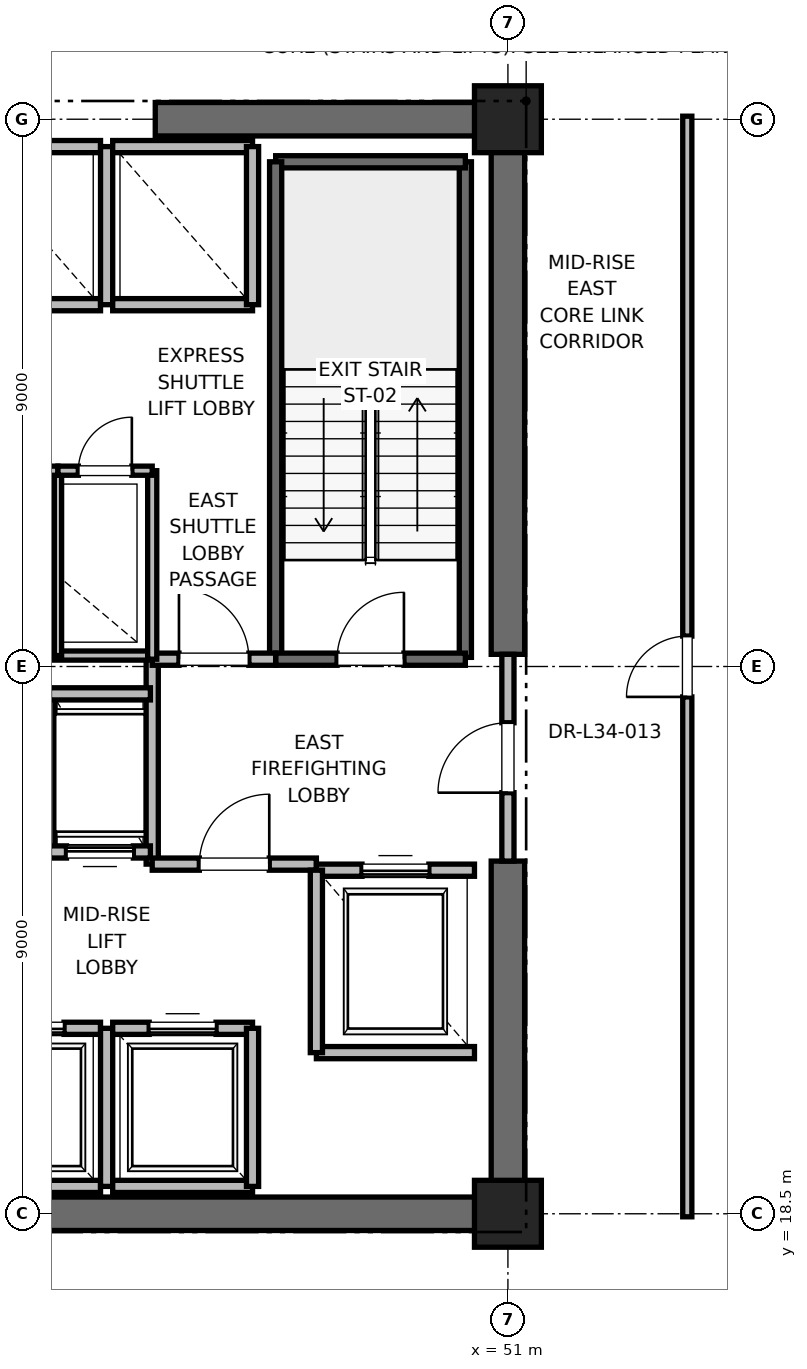
"""IFC4 building model, lengths in metres.
Left out: names, types, materials, properties, quantities, classifications, styles, units other than length and angle.
Written with IfcOpenShell. Run it as: python <this file> out.ifc"""

import sys

from ifc_helpers import new_model, si_unit, direction, frame, frame_2d, origin, origin_2d, place, context, subcontext, project, spatial, rectangle, extrude, element, fill, save


model = new_model("IFC4")
c1 = context("Model", 3, precision=1e-05, world=origin(), true_north=direction((0.0, 1.0)))
c2 = subcontext(c1, "Body", "Model", "MODEL_VIEW")
j1 = project(units=[si_unit("LENGTHUNIT", "METRE"), si_unit("PLANEANGLEUNIT", "RADIAN")], contexts=[c1])
p1 = place(None, origin())
s1 = spatial("IfcSite", under=j1, at=p1, CompositionType="ELEMENT")
p2 = place(p1, origin())
s2 = spatial("IfcBuilding", under=s1, at=p2, CompositionType="ELEMENT")
p3 = place(p2, frame((0.0, 0.0, 148.4)))
s3 = spatial("IfcBuildingStorey", under=s2, at=p3, CompositionType="ELEMENT", Elevation=148.4)
for number, where, z_axis, x_axis in (
    (1, (51.0, 18.5, 0.0), (0.0, 0.0, 1.0), (1.0, 0.0, 0.0)),
    (2, (51.0, 36.5, 0.0), (0.0, 0.0, 1.0), (1.0, 0.0, 0.0)),
):
    element("IfcColumn", number, at=place(p3, frame(where, z_axis=z_axis, x_axis=x_axis)), inside=s3, PredefinedType="PILASTER", context=c2, shape_type="SweptSolid", body=[
        extrude(rectangle(XDim=1.1, YDim=1.1, at=origin_2d()), origin(), (0.0, 0.0, 1.0), 4.0),
    ])
p4 = place(p3, frame((41.8, 18.5, 0.0), z_axis=(0.0, 0.0, 1.0), x_axis=(1.0, 0.0, 0.0)))
e3 = element("IfcWall", 3, at=p4, inside=s3, PredefinedType="SHEAR", context=c2, shape_type="SweptSolid", body=[
    extrude(rectangle(XDim=9.2, YDim=0.55, at=frame_2d((4.6, 0.0))), origin(), (0.0, 0.0, 1.0), 3.775),
])
for number, where, z_axis, x_axis in (
    (4, (45.2, 36.5, 0.0), (0.0, 0.0, 1.0), (1.0, 0.0, 0.0)),
    (5, (51.0, 18.5, 0.0), (0.0, 0.0, 1.0), (0.0, 1.0, 0.0)),
):
    element("IfcWall", number, at=place(p3, frame(where, z_axis=z_axis, x_axis=x_axis)), inside=s3, PredefinedType="SHEAR", context=c2, shape_type="SweptSolid", body=[
        extrude(rectangle(XDim=5.8, YDim=0.55, at=frame_2d((2.9, 0.0))), origin(), (0.0, 0.0, 1.0), 3.775),
    ])
p5 = place(p3, frame((51.0, 27.7, 0.0), z_axis=(0.0, 0.0, 1.0), x_axis=(0.0, 1.0, 0.0)))
e6 = element("IfcWall", 6, at=p5, inside=s3, PredefinedType="SHEAR", context=c2, shape_type="SweptSolid", body=[
    extrude(rectangle(XDim=8.8, YDim=0.55, at=frame_2d((4.4, 0.0))), origin(), (0.0, 0.0, 1.0), 3.775),
])
p6 = place(p3, frame((50.3, 27.65, 0.0), z_axis=(0.0, 0.0, 1.0), x_axis=(0.0, 1.0, 0.0)))
e7 = element("IfcWall", 7, at=p6, inside=s3, PredefinedType="SOLIDWALL", context=c2, shape_type="SweptSolid", body=[
    extrude(rectangle(XDim=8.15, YDim=0.2, at=frame_2d((4.075, 0.0))), origin(), (0.0, 0.0, 1.0), 3.775),
])
p7 = place(p3, frame((47.18, 35.8, 0.0), z_axis=(0.0, 0.0, 1.0), x_axis=(1.0, 0.0, 0.0)))
e8 = element("IfcWall", 8, at=p7, inside=s3, PredefinedType="SOLIDWALL", context=c2, shape_type="SweptSolid", body=[
    extrude(rectangle(XDim=3.12, YDim=0.2, at=frame_2d((1.56, 0.0))), origin(), (0.0, 0.0, 1.0), 3.775),
])
p8 = place(p3, frame((47.18, 27.62, 0.0), z_axis=(0.0, 0.0, 1.0), x_axis=(0.0, 1.0, 0.0)))
e9 = element("IfcWall", 9, at=p8, inside=s3, PredefinedType="SOLIDWALL", context=c2, shape_type="SweptSolid", body=[
    extrude(rectangle(XDim=8.18, YDim=0.2, at=frame_2d((4.09, 0.0))), origin(), (0.0, 0.0, 1.0), 3.775),
])
p9 = place(p3, frame((47.18, 27.62, 0.0), z_axis=(0.0, 0.0, 1.0), x_axis=(1.0, 0.0, 0.0)))
e10 = element("IfcWall", 10, at=p9, inside=s3, PredefinedType="SOLIDWALL", context=c2, shape_type="SweptSolid", body=[
    extrude(rectangle(XDim=3.12, YDim=0.2, at=frame_2d((1.56, 0.0))), origin(), (0.0, 0.0, 1.0), 3.775),
])
p10 = place(p9, frame((1.01, 0.0, 0.0)))
e11 = element("IfcOpeningElement", 11, at=p10, cuts=e10, PredefinedType="OPENING", context=c2, shape_type="SweptSolid", body=[
    extrude(rectangle(XDim=1.1, YDim=2.15, at=frame_2d((0.55, 1.075))), frame((0.0, 0.1, 0.0), z_axis=(0.0, -1.0, 0.0), x_axis=(1.0, 0.0, 0.0)), (0.0, 0.0, 1.0), 0.2),
])
p11 = place(p3, frame((45.15, 24.25, 0.0), z_axis=(0.0, 0.0, 1.0), x_axis=(0.0, 1.0, 0.0)))
e12 = element("IfcWall", 12, at=p11, inside=s3, PredefinedType="PARTITIONING", context=c2, shape_type="SweptSolid", body=[
    extrude(rectangle(XDim=3.37, YDim=0.2, at=frame_2d((1.685, 0.0))), origin(), (0.0, 0.0, 1.0), 3.775),
])
p12 = place(p3, frame((45.15, 24.25, 0.0), z_axis=(0.0, 0.0, 1.0), x_axis=(1.0, 0.0, 0.0)))
e13 = element("IfcWall", 13, at=p12, inside=s3, PredefinedType="PARTITIONING", context=c2, shape_type="SweptSolid", body=[
    extrude(rectangle(XDim=2.7, YDim=0.2, at=frame_2d((1.35, 0.0))), origin(), (0.0, 0.0, 1.0), 3.775),
])
p13 = place(p12, frame((0.775, 0.0, 0.0)))
e14 = element("IfcOpeningElement", 14, at=p13, cuts=e13, PredefinedType="OPENING", context=c2, shape_type="SweptSolid", body=[
    extrude(rectangle(XDim=1.15, YDim=2.2, at=frame_2d((0.575, 1.1))), frame((0.0, 0.1, 0.0), z_axis=(0.0, -1.0, 0.0), x_axis=(1.0, 0.0, 0.0)), (0.0, 0.0, 1.0), 0.2),
])
p14 = place(p3, frame((45.15, 27.62, 0.0), z_axis=(0.0, 0.0, 1.0), x_axis=(1.0, 0.0, 0.0)))
e15 = element("IfcWall", 15, at=p14, inside=s3, PredefinedType="PARTITIONING", context=c2, shape_type="SweptSolid", body=[
    extrude(rectangle(XDim=2.03, YDim=0.2, at=frame_2d((1.015, 0.0))), origin(), (0.0, 0.0, 1.0), 3.775),
])
p15 = place(p14, frame((0.44, 0.0, 0.0)))
e16 = element("IfcOpeningElement", 16, at=p15, cuts=e15, PredefinedType="OPENING", context=c2, shape_type="SweptSolid", body=[
    extrude(rectangle(XDim=1.15, YDim=2.2, at=frame_2d((0.575, 1.1))), frame((0.0, 0.1, 0.0), z_axis=(0.0, -1.0, 0.0), x_axis=(1.0, 0.0, 0.0)), (0.0, 0.0, 1.0), 0.2),
])
p16 = place(p3, frame((51.0, 24.3, 0.0), z_axis=(0.0, 0.0, 1.0), x_axis=(0.0, 1.0, 0.0)))
e17 = element("IfcWall", 17, at=p16, inside=s3, PredefinedType="PARTITIONING", context=c2, shape_type="SweptSolid", body=[
    extrude(rectangle(XDim=3.4, YDim=0.2, at=frame_2d((1.7, 0.0))), origin(), (0.0, 0.0, 1.0), 2.755),
])
p17 = place(p16, frame((1.125, 0.0, 0.0)))
e18 = element("IfcOpeningElement", 18, at=p17, cuts=e17, PredefinedType="OPENING", context=c2, shape_type="SweptSolid", body=[
    extrude(rectangle(XDim=1.15, YDim=2.2, at=frame_2d((0.575, 1.1))), frame((0.0, 0.1, 0.0), z_axis=(0.0, -1.0, 0.0), x_axis=(1.0, 0.0, 0.0)), (0.0, 0.0, 1.0), 0.2),
])
p18 = place(p3, frame((47.85, 21.15, 0.0), z_axis=(0.0, 0.0, 1.0), x_axis=(1.0, 0.0, 0.0)))
e19 = element("IfcWall", 19, at=p18, inside=s3, PredefinedType="SOLIDWALL", context=c2, shape_type="SweptSolid", body=[
    extrude(rectangle(XDim=2.6, YDim=0.2, at=frame_2d((1.3, 0.0))), origin(), (0.0, 0.0, 1.0), 3.775),
])
p19 = place(p3, frame((50.45, 24.15, 0.0), z_axis=(0.0, 0.0, 1.0), x_axis=(-1.0, 0.0, 0.0)))
e20 = element("IfcWall", 20, at=p19, inside=s3, PredefinedType="SOLIDWALL", context=c2, shape_type="SweptSolid", body=[
    extrude(rectangle(XDim=2.6, YDim=0.2, at=frame_2d((1.3, 0.0))), origin(), (0.0, 0.0, 1.0), 2.755),
])
p20 = place(p19, frame((0.75, 0.0, 0.0)))
e21 = element("IfcOpeningElement", 21, at=p20, cuts=e20, PredefinedType="OPENING", context=c2, shape_type="SweptSolid", body=[
    extrude(rectangle(XDim=1.1, YDim=2.2, at=frame_2d((0.55, 1.1))), frame((0.0, 0.1, 0.0), z_axis=(0.0, -1.0, 0.0), x_axis=(1.0, 0.0, 0.0)), (0.0, 0.0, 1.0), 0.2),
])
p21 = place(p3, frame((47.85, 24.15, 0.0), z_axis=(0.0, 0.0, 1.0), x_axis=(0.0, -1.0, 0.0)))
e22 = element("IfcWall", 22, at=p21, inside=s3, PredefinedType="SOLIDWALL", context=c2, shape_type="SweptSolid", body=[
    extrude(rectangle(XDim=3.0, YDim=0.2, at=frame_2d((1.5, 0.0))), origin(), (0.0, 0.0, 1.0), 3.775),
])
p22 = place(p3, frame((42.0, 18.95, 0.0), z_axis=(0.0, 0.0, 1.0), x_axis=(1.0, 0.0, 0.0)))
e23 = element("IfcWall", 23, at=p22, inside=s3, PredefinedType="SOLIDWALL", context=c2, shape_type="SweptSolid", body=[
    extrude(rectangle(XDim=2.3, YDim=0.2, at=frame_2d((1.15, 0.0))), origin(), (0.0, 0.0, 1.0), 2.755),
])
p23 = place(p3, frame((44.3, 21.55, 0.0), z_axis=(0.0, 0.0, 1.0), x_axis=(-1.0, 0.0, 0.0)))
e24 = element("IfcWall", 24, at=p23, inside=s3, PredefinedType="SOLIDWALL", context=c2, shape_type="SweptSolid", body=[
    extrude(rectangle(XDim=2.3, YDim=0.2, at=frame_2d((1.15, 0.0))), origin(), (0.0, 0.0, 1.0), 3.775),
])
p24 = place(p23, frame((0.6, 0.0, 0.0)))
e25 = element("IfcOpeningElement", 25, at=p24, cuts=e24, PredefinedType="OPENING", context=c2, shape_type="SweptSolid", body=[
    extrude(rectangle(XDim=1.1, YDim=2.2, at=frame_2d((0.55, 1.1))), frame((0.0, 0.1, 0.0), z_axis=(0.0, -1.0, 0.0), x_axis=(1.0, 0.0, 0.0)), (0.0, 0.0, 1.0), 0.2),
])
p25 = place(p3, frame((44.4, 18.95, 0.0), z_axis=(0.0, 0.0, 1.0), x_axis=(0.0, 1.0, 0.0)))
e26 = element("IfcWall", 26, at=p25, inside=s3, PredefinedType="SOLIDWALL", context=c2, shape_type="SweptSolid", body=[
    extrude(rectangle(XDim=2.6, YDim=0.2, at=frame_2d((1.3, 0.0))), origin(), (0.0, 0.0, 1.0), 3.775),
])
p26 = place(p3, frame((44.5, 18.95, 0.0), z_axis=(0.0, 0.0, 1.0), x_axis=(1.0, 0.0, 0.0)))
e27 = element("IfcWall", 27, at=p26, inside=s3, PredefinedType="SOLIDWALL", context=c2, shape_type="SweptSolid", body=[
    extrude(rectangle(XDim=2.3, YDim=0.2, at=frame_2d((1.15, 0.0))), origin(), (0.0, 0.0, 1.0), 3.775),
])
p27 = place(p3, frame((46.8, 21.55, 0.0), z_axis=(0.0, 0.0, 1.0), x_axis=(-1.0, 0.0, 0.0)))
e28 = element("IfcWall", 28, at=p27, inside=s3, PredefinedType="SOLIDWALL", context=c2, shape_type="SweptSolid", body=[
    extrude(rectangle(XDim=2.3, YDim=0.2, at=frame_2d((1.15, 0.0))), origin(), (0.0, 0.0, 1.0), 3.775),
])
p28 = place(p27, frame((0.6, 0.0, 0.0)))
e29 = element("IfcOpeningElement", 29, at=p28, cuts=e28, PredefinedType="OPENING", context=c2, shape_type="SweptSolid", body=[
    extrude(rectangle(XDim=1.1, YDim=2.2, at=frame_2d((0.55, 1.1))), frame((0.0, 0.1, 0.0), z_axis=(0.0, -1.0, 0.0), x_axis=(1.0, 0.0, 0.0)), (0.0, 0.0, 1.0), 0.2),
])
for number, where, z_axis, x_axis in (
    (30, (46.8, 18.95, 0.0), (0.0, 0.0, 1.0), (0.0, 1.0, 0.0)),
    (31, (43.45, 24.45, 0.0), (0.0, 0.0, 1.0), (0.0, 1.0, 0.0)),
):
    element("IfcWall", number, at=place(p3, frame(where, z_axis=z_axis, x_axis=x_axis)), inside=s3, PredefinedType="SOLIDWALL", context=c2, shape_type="SweptSolid", body=[
        extrude(rectangle(XDim=2.6, YDim=0.2, at=frame_2d((1.3, 0.0))), origin(), (0.0, 0.0, 1.0), 3.775),
    ])
p29 = place(p3, frame((43.46, 24.45, 0.0), z_axis=(0.0, 0.0, 1.0), x_axis=(1.0, 0.0, 0.0)))
e32 = element("IfcWall", 32, at=p29, inside=s3, PredefinedType="SOLIDWALL", context=c2, shape_type="SweptSolid", body=[
    extrude(rectangle(XDim=1.66, YDim=0.2, at=frame_2d((0.83, 0.0))), origin(), (0.0, 0.0, 1.0), 3.775),
])
p30 = place(p29, frame((0.28, 0.0, 0.0)))
e33 = element("IfcOpeningElement", 33, at=p30, cuts=e32, PredefinedType="OPENING", context=c2, shape_type="SweptSolid", body=[
    extrude(rectangle(XDim=1.1, YDim=2.2, at=frame_2d((0.55, 1.1))), frame((0.0, 0.1, 0.0), z_axis=(0.0, -1.0, 0.0), x_axis=(1.0, 0.0, 0.0)), (0.0, 0.0, 1.0), 0.2),
])
p31 = place(p3, frame((45.12, 27.05, 0.0), z_axis=(0.0, 0.0, 1.0), x_axis=(-1.0, 0.0, 0.0)))
e34 = element("IfcWall", 34, at=p31, inside=s3, PredefinedType="SOLIDWALL", context=c2, shape_type="SweptSolid", body=[
    extrude(rectangle(XDim=1.66, YDim=0.2, at=frame_2d((0.83, 0.0))), origin(), (0.0, 0.0, 1.0), 3.775),
])
p32 = place(p3, frame((42.0, 33.45, 0.0), z_axis=(0.0, 0.0, 1.0), x_axis=(1.0, 0.0, 0.0)))
e35 = element("IfcWall", 35, at=p32, inside=s3, PredefinedType="SOLIDWALL", context=c2, shape_type="SweptSolid", body=[
    extrude(rectangle(XDim=2.3, YDim=0.2, at=frame_2d((1.15, 0.0))), origin(), (0.0, 0.0, 1.0), 3.775),
])
p33 = place(p3, frame((44.3, 36.05, 0.0), z_axis=(0.0, 0.0, 1.0), x_axis=(-1.0, 0.0, 0.0)))
e36 = element("IfcWall", 36, at=p33, inside=s3, PredefinedType="SOLIDWALL", context=c2, shape_type="SweptSolid", body=[
    extrude(rectangle(XDim=2.3, YDim=0.2, at=frame_2d((1.15, 0.0))), origin(), (0.0, 0.0, 1.0), 2.755),
])
p34 = place(p3, frame((44.4, 33.45, 0.0), z_axis=(0.0, 0.0, 1.0), x_axis=(0.0, 1.0, 0.0)))
e37 = element("IfcWall", 37, at=p34, inside=s3, PredefinedType="SOLIDWALL", context=c2, shape_type="SweptSolid", body=[
    extrude(rectangle(XDim=2.6, YDim=0.2, at=frame_2d((1.3, 0.0))), origin(), (0.0, 0.0, 1.0), 2.755),
])
p35 = place(p3, frame((44.5, 33.45, 0.0), z_axis=(0.0, 0.0, 1.0), x_axis=(1.0, 0.0, 0.0)))
e38 = element("IfcWall", 38, at=p35, inside=s3, PredefinedType="SOLIDWALL", context=c2, shape_type="SweptSolid", body=[
    extrude(rectangle(XDim=2.3, YDim=0.2, at=frame_2d((1.15, 0.0))), origin(), (0.0, 0.0, 1.0), 3.775),
])
p36 = place(p3, frame((46.8, 36.05, 0.0), z_axis=(0.0, 0.0, 1.0), x_axis=(-1.0, 0.0, 0.0)))
e39 = element("IfcWall", 39, at=p36, inside=s3, PredefinedType="SOLIDWALL", context=c2, shape_type="SweptSolid", body=[
    extrude(rectangle(XDim=2.3, YDim=0.2, at=frame_2d((1.15, 0.0))), origin(), (0.0, 0.0, 1.0), 2.755),
])
p37 = place(p3, frame((46.8, 33.45, 0.0), z_axis=(0.0, 0.0, 1.0), x_axis=(0.0, 1.0, 0.0)))
e40 = element("IfcWall", 40, at=p37, inside=s3, PredefinedType="SOLIDWALL", context=c2, shape_type="SweptSolid", body=[
    extrude(rectangle(XDim=2.6, YDim=0.2, at=frame_2d((1.3, 0.0))), origin(), (0.0, 0.0, 1.0), 3.775),
])
p38 = place(p3, frame((41.56, 27.68, 0.0), z_axis=(0.0, 0.0, 1.0), x_axis=(1.0, 0.0, 0.0)))
e41 = element("IfcWall", 41, at=p38, inside=s3, PredefinedType="PARTITIONING", context=c2, shape_type="SweptSolid", body=[
    extrude(rectangle(XDim=3.59, YDim=0.15, at=frame_2d((1.795, 0.0))), origin(), (0.0, 0.0, 1.0), 2.85),
])
p39 = place(p3, frame((45.15, 27.62, 0.0), z_axis=(0.0, 0.0, 1.0), x_axis=(0.0, 1.0, 0.0)))
e42 = element("IfcWall", 42, at=p39, inside=s3, PredefinedType="PARTITIONING", context=c2, shape_type="SweptSolid", body=[
    extrude(rectangle(XDim=3.1, YDim=0.15, at=frame_2d((1.55, 0.0))), origin(), (0.0, 0.0, 1.0), 2.85),
])
p40 = place(p3, frame((43.6, 27.68, 0.0), z_axis=(0.0, 0.0, 1.0), x_axis=(0.0, 1.0, 0.0)))
e43 = element("IfcWall", 43, at=p40, inside=s3, PredefinedType="PARTITIONING", context=c2, shape_type="SweptSolid", body=[
    extrude(rectangle(XDim=3.04, YDim=0.12, at=frame_2d((1.52, 0.0))), origin(), (0.0, 0.0, 1.0), 2.85),
])
p41 = place(p3, frame((41.56, 30.72, 0.0), z_axis=(0.0, 0.0, 1.0), x_axis=(1.0, 0.0, 0.0)))
e44 = element("IfcWall", 44, at=p41, inside=s3, PredefinedType="PARTITIONING", context=c2, shape_type="SweptSolid", body=[
    extrude(rectangle(XDim=2.04, YDim=0.15, at=frame_2d((1.02, 0.0))), origin(), (0.0, 0.0, 1.0), 2.85),
])
p42 = place(p41, frame((0.58, 0.0, 0.0)))
e45 = element("IfcOpeningElement", 45, at=p42, cuts=e44, PredefinedType="OPENING", context=c2, shape_type="SweptSolid", body=[
    extrude(rectangle(XDim=0.88, YDim=2.1, at=frame_2d((0.44, 1.05))), frame((0.0, 0.075, 0.0), z_axis=(0.0, -1.0, 0.0), x_axis=(1.0, 0.0, 0.0)), (0.0, 0.0, 1.0), 0.15),
])
p43 = place(p3, frame((43.6, 30.72, 0.0), z_axis=(0.0, 0.0, 1.0), x_axis=(1.0, 0.0, 0.0)))
e46 = element("IfcWall", 46, at=p43, inside=s3, PredefinedType="PARTITIONING", context=c2, shape_type="SweptSolid", body=[
    extrude(rectangle(XDim=1.55, YDim=0.15, at=frame_2d((0.775, 0.0))), origin(), (0.0, 0.0, 1.0), 2.85),
])
p44 = place(p43, frame((0.335, 0.0, 0.0)))
e47 = element("IfcOpeningElement", 47, at=p44, cuts=e46, PredefinedType="OPENING", context=c2, shape_type="SweptSolid", body=[
    extrude(rectangle(XDim=0.88, YDim=2.1, at=frame_2d((0.44, 1.05))), frame((0.0, 0.075, 0.0), z_axis=(0.0, -1.0, 0.0), x_axis=(1.0, 0.0, 0.0)), (0.0, 0.0, 1.0), 0.15),
])
p45 = place(p3, frame((53.95, 18.45, 0.0), z_axis=(0.0, 0.0, 1.0), x_axis=(0.0, 1.0, 0.0)))
e48 = element("IfcWall", 48, at=p45, inside=s3, PredefinedType="PARTITIONING", context=c2, shape_type="SweptSolid", body=[
    extrude(rectangle(XDim=18.1, YDim=0.15, at=frame_2d((9.05, 0.0))), origin(), (0.0, 0.0, 1.0), 2.85),
])
p46 = place(p45, frame((8.55, 0.0, 0.0)))
e49 = element("IfcOpeningElement", 49, at=p46, cuts=e48, PredefinedType="OPENING", context=c2, shape_type="SweptSolid", body=[
    extrude(rectangle(XDim=1.0, YDim=2.15, at=frame_2d((0.5, 1.075))), frame((0.0, 0.075, 0.0), z_axis=(0.0, -1.0, 0.0), x_axis=(1.0, 0.0, 0.0)), (0.0, 0.0, 1.0), 0.15),
])
p47 = place(p10, origin())
e50 = element("IfcDoor", 50, at=p47, inside=s3, OperationType="SINGLE_SWING_RIGHT", PredefinedType="DOOR", context=c2, shape_type="SweptSolid", body=[
    extrude(rectangle(XDim=1.1, YDim=2.15, at=frame_2d((0.55, 1.075))), frame((0.0, 0.025, 0.0), z_axis=(0.0, -1.0, 0.0), x_axis=(1.0, 0.0, 0.0)), (0.0, 0.0, 1.0), 0.05),
])
fill(e11, e50)
p48 = place(p13, origin())
e51 = element("IfcDoor", 51, at=p48, inside=s3, OperationType="SINGLE_SWING_RIGHT", PredefinedType="DOOR", context=c2, shape_type="SweptSolid", body=[
    extrude(rectangle(XDim=1.15, YDim=2.2, at=frame_2d((0.575, 1.1))), frame((0.0, 0.025, 0.0), z_axis=(0.0, -1.0, 0.0), x_axis=(1.0, 0.0, 0.0)), (0.0, 0.0, 1.0), 0.05),
])
fill(e14, e51)
p49 = place(p15, origin())
e52 = element("IfcDoor", 52, at=p49, inside=s3, OperationType="SINGLE_SWING_LEFT", PredefinedType="DOOR", context=c2, shape_type="SweptSolid", body=[
    extrude(rectangle(XDim=1.15, YDim=2.2, at=frame_2d((0.575, 1.1))), frame((0.0, 0.025, 0.0), z_axis=(0.0, -1.0, 0.0), x_axis=(1.0, 0.0, 0.0)), (0.0, 0.0, 1.0), 0.05),
])
fill(e16, e52)
p50 = place(p17, origin())
e53 = element("IfcDoor", 53, at=p50, inside=s3, OperationType="SINGLE_SWING_LEFT", PredefinedType="DOOR", context=c2, shape_type="SweptSolid", body=[
    extrude(rectangle(XDim=1.15, YDim=2.2, at=frame_2d((0.575, 1.1))), frame((0.0, 0.025, 0.0), z_axis=(0.0, -1.0, 0.0), x_axis=(1.0, 0.0, 0.0)), (0.0, 0.0, 1.0), 0.05),
])
fill(e18, e53)
p51 = place(p20, origin())
e54 = element("IfcDoor", 54, at=p51, inside=s3, OperationType="SLIDING_TO_RIGHT", PredefinedType="DOOR", context=c2, shape_type="SweptSolid", body=[
    extrude(rectangle(XDim=1.1, YDim=2.2, at=frame_2d((0.55, 1.1))), frame((0.0, 0.025, 0.0), z_axis=(0.0, -1.0, 0.0), x_axis=(1.0, 0.0, 0.0)), (0.0, 0.0, 1.0), 0.05),
])
fill(e21, e54)
p52 = place(p24, origin())
e55 = element("IfcDoor", 55, at=p52, inside=s3, OperationType="SLIDING_TO_RIGHT", PredefinedType="DOOR", context=c2, shape_type="SweptSolid", body=[
    extrude(rectangle(XDim=1.1, YDim=2.2, at=frame_2d((0.55, 1.1))), frame((0.0, 0.025, 0.0), z_axis=(0.0, -1.0, 0.0), x_axis=(1.0, 0.0, 0.0)), (0.0, 0.0, 1.0), 0.05),
])
fill(e25, e55)
p53 = place(p28, origin())
e56 = element("IfcDoor", 56, at=p53, inside=s3, OperationType="SLIDING_TO_RIGHT", PredefinedType="DOOR", context=c2, shape_type="SweptSolid", body=[
    extrude(rectangle(XDim=1.1, YDim=2.2, at=frame_2d((0.55, 1.1))), frame((0.0, 0.025, 0.0), z_axis=(0.0, -1.0, 0.0), x_axis=(1.0, 0.0, 0.0)), (0.0, 0.0, 1.0), 0.05),
])
fill(e29, e56)
p54 = place(p30, origin())
e57 = element("IfcDoor", 57, at=p54, inside=s3, OperationType="SLIDING_TO_RIGHT", PredefinedType="DOOR", context=c2, shape_type="SweptSolid", body=[
    extrude(rectangle(XDim=1.1, YDim=2.2, at=frame_2d((0.55, 1.1))), frame((0.0, 0.025, 0.0), z_axis=(0.0, -1.0, 0.0), x_axis=(1.0, 0.0, 0.0)), (0.0, 0.0, 1.0), 0.05),
])
fill(e33, e57)
p55 = place(p44, origin())
e58 = element("IfcDoor", 58, at=p55, inside=s3, OperationType="SINGLE_SWING_RIGHT", PredefinedType="DOOR", context=c2, shape_type="SweptSolid", body=[
    extrude(rectangle(XDim=0.88, YDim=2.1, at=frame_2d((0.44, 1.05))), frame((0.0, 0.025, 0.0), z_axis=(0.0, -1.0, 0.0), x_axis=(1.0, 0.0, 0.0)), (0.0, 0.0, 1.0), 0.05),
])
fill(e47, e58)
p56 = place(p46, origin())
e59 = element("IfcDoor", 59, at=p56, inside=s3, OperationType="SINGLE_SWING_LEFT", PredefinedType="DOOR", context=c2, shape_type="SweptSolid", body=[
    extrude(rectangle(XDim=1.0, YDim=2.15, at=frame_2d((0.5, 1.075))), frame((0.0, 0.025, 0.0), z_axis=(0.0, -1.0, 0.0), x_axis=(1.0, 0.0, 0.0)), (0.0, 0.0, 1.0), 0.05),
])
fill(e49, e59)
save(model, sys.argv[1])
